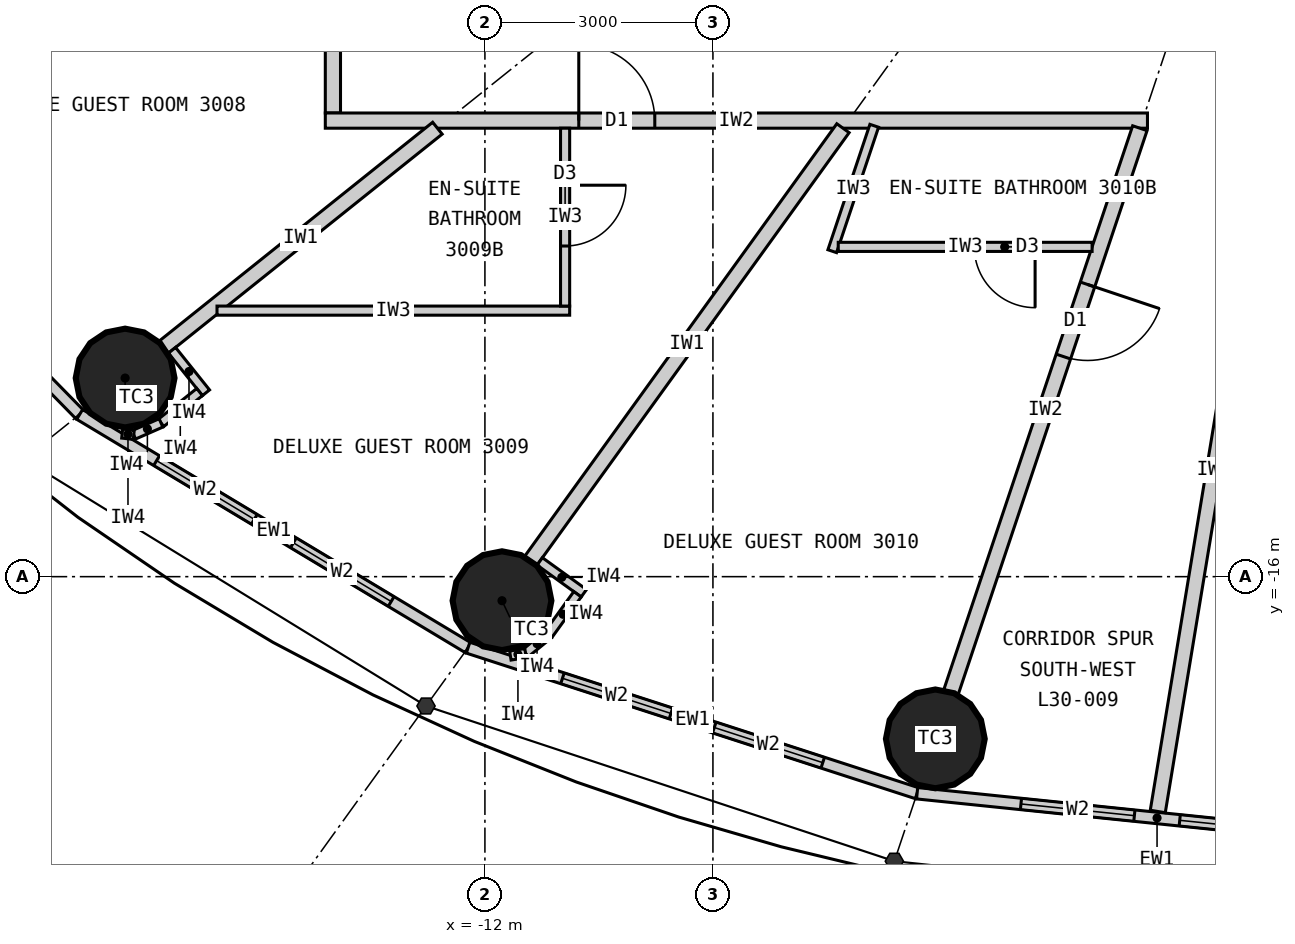
"""IFC4 building model, lengths in metres.
Left out: names, types, materials, properties, quantities, classifications, styles, units other than length and angle.
Written with IfcOpenShell. Run it as: python <this file> out.ifc"""

import sys

from ifc_helpers import new_model, si_unit, direction, frame, frame_2d, origin, origin_2d, place, context, subcontext, project, spatial, rectangle, circle, extrude, element, fill, save


model = new_model("IFC4")
c1 = context("Model", 3, precision=1e-05, world=origin(), true_north=direction((0.0, 1.0)))
c2 = subcontext(c1, "Body", "Model", "MODEL_VIEW")
j1 = project(units=[si_unit("LENGTHUNIT", "METRE"), si_unit("PLANEANGLEUNIT", "RADIAN")], contexts=[c1])
p1 = place(None, origin())
s1 = spatial("IfcSite", under=j1, at=p1, CompositionType="ELEMENT")
p2 = place(p1, origin())
s2 = spatial("IfcBuilding", under=s1, at=p2, CompositionType="ELEMENT")
p3 = place(p2, frame((0.0, 0.0, 118.8)))
s3 = spatial("IfcBuildingStorey", under=s2, at=p3, CompositionType="ELEMENT", Elevation=118.8)
for number, where, z_axis, x_axis in (
    (1, (-16.734, -13.387, 0.0), (0.0, 0.0, 1.0), (1.0, 0.0, 0.0)),
    (2, (-11.775, -16.316, 0.0), (0.0, 0.0, 1.0), (1.0, 0.0, 0.0)),
    (3, (-6.074, -18.135, 0.0), (0.0, 0.0, 1.0), (1.0, 0.0, 0.0)),
):
    element("IfcColumn", number, at=place(p3, frame(where, z_axis=z_axis, x_axis=x_axis)), inside=s3, PredefinedType="COLUMN", context=c2, shape_type="SweptSolid", body=[
        extrude(circle(Radius=0.65, at=origin_2d()), origin(), (0.0, 0.0, 1.0), 3.3),
    ])
p4 = place(p3, frame((-21.287, -9.832, 0.0), z_axis=(0.0, 0.0, 1.0), x_axis=(0.700136650834, -0.714008872605, 0.0)))
e4 = element("IfcWall", 4, at=p4, inside=s3, PredefinedType="ELEMENTEDWALL", context=c2, shape_type="SweptSolid", body=[
    extrude(rectangle(XDim=5.649, YDim=0.15, at=frame_2d((2.825, 0.0))), origin(), (0.0, 0.0, 1.0), 3.12),
])
p5 = place(p4, frame((1.025, 0.0, 0.9)))
e5 = element("IfcOpeningElement", 5, at=p5, cuts=e4, PredefinedType="OPENING", context=c2, shape_type="SweptSolid", body=[
    extrude(rectangle(XDim=1.5, YDim=1.9, at=frame_2d((0.75, 0.95))), frame((0.0, 0.085, 0.0), z_axis=(0.0, -1.0, 0.0), x_axis=(1.0, 0.0, 0.0)), (0.0, 0.0, 1.0), 0.17),
])
p6 = place(p4, frame((3.125, 0.0, 0.9)))
e6 = element("IfcOpeningElement", 6, at=p6, cuts=e4, PredefinedType="OPENING", context=c2, shape_type="SweptSolid", body=[
    extrude(rectangle(XDim=1.5, YDim=1.9, at=frame_2d((0.75, 0.95))), frame((0.0, 0.085, 0.0), z_axis=(0.0, -1.0, 0.0), x_axis=(1.0, 0.0, 0.0)), (0.0, 0.0, 1.0), 0.17),
])
p7 = place(p3, frame((-17.332, -13.866, 0.0), z_axis=(0.0, 0.0, 1.0), x_axis=(0.857308573723, -0.514802884044, 0.0)))
e7 = element("IfcWall", 7, at=p7, inside=s3, PredefinedType="ELEMENTEDWALL", context=c2, shape_type="SweptSolid", body=[
    extrude(rectangle(XDim=5.961, YDim=0.15, at=frame_2d((2.98, 0.0))), origin(), (0.0, 0.0, 1.0), 3.12),
])
p8 = place(p7, frame((1.181, 0.0, 0.9)))
e8 = element("IfcOpeningElement", 8, at=p8, cuts=e7, PredefinedType="OPENING", context=c2, shape_type="SweptSolid", body=[
    extrude(rectangle(XDim=1.5, YDim=1.9, at=frame_2d((0.75, 0.95))), frame((0.0, 0.085, 0.0), z_axis=(0.0, -1.0, 0.0), x_axis=(1.0, 0.0, 0.0)), (0.0, 0.0, 1.0), 0.17),
])
p9 = place(p7, frame((3.281, 0.0, 0.9)))
e9 = element("IfcOpeningElement", 9, at=p9, cuts=e7, PredefinedType="OPENING", context=c2, shape_type="SweptSolid", body=[
    extrude(rectangle(XDim=1.5, YDim=1.9, at=frame_2d((0.75, 0.95))), frame((0.0, 0.085, 0.0), z_axis=(0.0, -1.0, 0.0), x_axis=(1.0, 0.0, 0.0)), (0.0, 0.0, 1.0), 0.17),
])
p10 = place(p3, frame((-12.221, -16.935, 0.0), z_axis=(0.0, 0.0, 1.0), x_axis=(0.951272691506, -0.308350881944, 0.0)))
e10 = element("IfcWall", 10, at=p10, inside=s3, PredefinedType="ELEMENTEDWALL", context=c2, shape_type="SweptSolid", body=[
    extrude(rectangle(XDim=6.211, YDim=0.15, at=frame_2d((3.105, 0.0))), origin(), (0.0, 0.0, 1.0), 3.12),
])
p11 = place(p10, frame((1.305, 0.0, 0.9)))
e11 = element("IfcOpeningElement", 11, at=p11, cuts=e10, PredefinedType="OPENING", context=c2, shape_type="SweptSolid", body=[
    extrude(rectangle(XDim=1.5, YDim=1.9, at=frame_2d((0.75, 0.95))), frame((0.0, 0.085, 0.0), z_axis=(0.0, -1.0, 0.0), x_axis=(1.0, 0.0, 0.0)), (0.0, 0.0, 1.0), 0.17),
])
p12 = place(p10, frame((3.405, 0.0, 0.9)))
e12 = element("IfcOpeningElement", 12, at=p12, cuts=e10, PredefinedType="OPENING", context=c2, shape_type="SweptSolid", body=[
    extrude(rectangle(XDim=1.5, YDim=1.9, at=frame_2d((0.75, 0.95))), frame((0.0, 0.085, 0.0), z_axis=(0.0, -1.0, 0.0), x_axis=(1.0, 0.0, 0.0)), (0.0, 0.0, 1.0), 0.17),
])
p13 = place(p3, frame((-6.313, -18.85, 0.0), z_axis=(0.0, 0.0, 1.0), x_axis=(0.994735690163, -0.102473931887, 0.0)))
e13 = element("IfcWall", 13, at=p13, inside=s3, PredefinedType="ELEMENTEDWALL", context=c2, shape_type="SweptSolid", body=[
    extrude(rectangle(XDim=6.347, YDim=0.15, at=frame_2d((3.173, 0.0))), origin(), (0.0, 0.0, 1.0), 3.12),
])
p14 = place(p13, frame((1.373, 0.0, 0.9)))
e14 = element("IfcOpeningElement", 14, at=p14, cuts=e13, PredefinedType="OPENING", context=c2, shape_type="SweptSolid", body=[
    extrude(rectangle(XDim=1.5, YDim=1.9, at=frame_2d((0.75, 0.95))), frame((0.0, 0.085, 0.0), z_axis=(0.0, -1.0, 0.0), x_axis=(1.0, 0.0, 0.0)), (0.0, 0.0, 1.0), 0.17),
])
p15 = place(p13, frame((3.473, 0.0, 0.9)))
e15 = element("IfcOpeningElement", 15, at=p15, cuts=e13, PredefinedType="OPENING", context=c2, shape_type="SweptSolid", body=[
    extrude(rectangle(XDim=1.5, YDim=1.9, at=frame_2d((0.75, 0.95))), frame((0.0, 0.085, 0.0), z_axis=(0.0, -1.0, 0.0), x_axis=(1.0, 0.0, 0.0)), (0.0, 0.0, 1.0), 0.17),
])
p16 = place(p3, frame((-14.0, 9.9, 0.0), z_axis=(0.0, 0.0, 1.0), x_axis=(0.0, -1.0, 0.0)))
e16 = element("IfcWall", 16, at=p16, inside=s3, PredefinedType="PARTITIONING", context=c2, shape_type="SweptSolid", body=[
    extrude(rectangle(XDim=19.8, YDim=0.2, at=frame_2d((9.9, 0.0))), origin(), (0.0, 0.0, 1.0), 3.12),
])
p17 = place(p16, frame((1.678, 0.0, 0.0)))
e17 = element("IfcOpeningElement", 17, at=p17, cuts=e16, PredefinedType="OPENING", context=c2, shape_type="SweptSolid", body=[
    extrude(rectangle(XDim=1.0, YDim=2.2, at=frame_2d((0.5, 1.1))), frame((0.0, 0.11, 0.0), z_axis=(0.0, -1.0, 0.0), x_axis=(1.0, 0.0, 0.0)), (0.0, 0.0, 1.0), 0.22),
])
p18 = place(p16, frame((7.598, 0.0, 0.0)))
e18 = element("IfcOpeningElement", 18, at=p18, cuts=e16, PredefinedType="OPENING", context=c2, shape_type="SweptSolid", body=[
    extrude(rectangle(XDim=1.0, YDim=2.2, at=frame_2d((0.5, 1.1))), frame((0.0, 0.11, 0.0), z_axis=(0.0, -1.0, 0.0), x_axis=(1.0, 0.0, 0.0)), (0.0, 0.0, 1.0), 0.22),
])
p19 = place(p16, frame((12.26, 0.0, 0.0)))
e19 = element("IfcOpeningElement", 19, at=p19, cuts=e16, PredefinedType="OPENING", context=c2, shape_type="SweptSolid", body=[
    extrude(rectangle(XDim=1.0, YDim=2.2, at=frame_2d((0.5, 1.1))), frame((0.0, 0.11, 0.0), z_axis=(0.0, -1.0, 0.0), x_axis=(1.0, 0.0, 0.0)), (0.0, 0.0, 1.0), 0.22),
])
p20 = place(p16, frame((16.922, 0.0, 0.0)))
e20 = element("IfcOpeningElement", 20, at=p20, cuts=e16, PredefinedType="OPENING", context=c2, shape_type="SweptSolid", body=[
    extrude(rectangle(XDim=1.0, YDim=2.2, at=frame_2d((0.5, 1.1))), frame((0.0, 0.11, 0.0), z_axis=(0.0, -1.0, 0.0), x_axis=(1.0, 0.0, 0.0)), (0.0, 0.0, 1.0), 0.22),
])
p21 = place(p3, frame((-3.283, -10.0, 0.0), z_axis=(0.0, 0.0, 1.0), x_axis=(-1.0, 0.0, 0.0)))
e21 = element("IfcWall", 21, at=p21, inside=s3, PredefinedType="PARTITIONING", context=c2, shape_type="SweptSolid", body=[
    extrude(rectangle(XDim=10.817, YDim=0.2, at=frame_2d((5.409, 0.0))), origin(), (0.0, 0.0, 1.0), 3.12),
])
p22 = place(p21, frame((6.482, 0.0, 0.0)))
e22 = element("IfcOpeningElement", 22, at=p22, cuts=e21, PredefinedType="OPENING", context=c2, shape_type="SweptSolid", body=[
    extrude(rectangle(XDim=1.0, YDim=2.2, at=frame_2d((0.5, 1.1))), frame((0.0, 0.11, 0.0), z_axis=(0.0, -1.0, 0.0), x_axis=(1.0, 0.0, 0.0)), (0.0, 0.0, 1.0), 0.22),
])
p23 = place(p3, frame((-12.625, -10.1, 0.0), z_axis=(0.0, 0.0, 1.0), x_axis=(-0.780863644897, -0.624701503182, 0.0)))
e23 = element("IfcWall", 23, at=p23, inside=s3, PredefinedType="PARTITIONING", context=c2, shape_type="SweptSolid", body=[
    extrude(rectangle(XDim=4.612, YDim=0.2, at=frame_2d((2.306, 0.0))), origin(), (0.0, 0.0, 1.0), 2.37),
])
p24 = place(p3, frame((-7.289, -10.1, 0.0), z_axis=(0.0, 0.0, 1.0), x_axis=(-0.585217367024, -0.81087645997, 0.0)))
e24 = element("IfcWall", 24, at=p24, inside=s3, PredefinedType="PARTITIONING", context=c2, shape_type="SweptSolid", body=[
    extrude(rectangle(XDim=7.016, YDim=0.2, at=frame_2d((3.508, 0.0))), origin(), (0.0, 0.0, 1.0), 2.37),
])
p25 = place(p3, frame((-3.383, -10.1, 0.0), z_axis=(0.0, 0.0, 1.0), x_axis=(-0.317603705574, -0.948223542318, 0.0)))
e25 = element("IfcWall", 25, at=p25, inside=s3, PredefinedType="PARTITIONING", context=c2, shape_type="SweptSolid", body=[
    extrude(rectangle(XDim=7.823, YDim=0.2, at=frame_2d((3.912, 0.0))), origin(), (0.0, 0.0, 1.0), 2.37),
])
p26 = place(p25, frame((2.168, 0.0, 0.0)))
e26 = element("IfcOpeningElement", 26, at=p26, cuts=e25, PredefinedType="OPENING", context=c2, shape_type="SweptSolid", body=[
    extrude(rectangle(XDim=1.0, YDim=2.2, at=frame_2d((0.5, 1.1))), frame((0.0, 0.11, 0.0), z_axis=(0.0, -1.0, 0.0), x_axis=(1.0, 0.0, 0.0)), (0.0, 0.0, 1.0), 0.22),
])
p27 = place(p3, frame((-1.665, -10.1, 0.0), z_axis=(0.0, 0.0, 1.0), x_axis=(-0.162660519103, -0.986682094459, 0.0)))
e27 = element("IfcWall", 27, at=p27, inside=s3, PredefinedType="PARTITIONING", context=c2, shape_type="SweptSolid", body=[
    extrude(rectangle(XDim=9.111, YDim=0.2, at=frame_2d((4.555, 0.0))), origin(), (0.0, 0.0, 1.0), 3.12),
])
p28 = place(p27, frame((1.86, 0.0, 0.0)))
e28 = element("IfcOpeningElement", 28, at=p28, cuts=e27, PredefinedType="OPENING", context=c2, shape_type="SweptSolid", body=[
    extrude(rectangle(XDim=1.0, YDim=2.2, at=frame_2d((0.5, 1.1))), frame((0.0, 0.11, 0.0), z_axis=(0.0, -1.0, 0.0), x_axis=(1.0, 0.0, 0.0)), (0.0, 0.0, 1.0), 0.22),
])
p29 = place(p3, frame((-15.525, -12.5, 0.0), z_axis=(0.0, 0.0, 1.0), x_axis=(1.0, 0.0, 0.0)))
e29 = element("IfcWall", 29, at=p29, inside=s3, PredefinedType="PARTITIONING", context=c2, shape_type="SweptSolid", body=[
    extrude(rectangle(XDim=4.64, YDim=0.12, at=frame_2d((2.32, 0.0))), origin(), (0.0, 0.0, 1.0), 3.12),
])
p30 = place(p3, frame((-10.945, -10.1, 0.0), z_axis=(0.0, 0.0, 1.0), x_axis=(0.0, -1.0, 0.0)))
e30 = element("IfcWall", 30, at=p30, inside=s3, PredefinedType="PARTITIONING", context=c2, shape_type="SweptSolid", body=[
    extrude(rectangle(XDim=2.34, YDim=0.12, at=frame_2d((1.17, 0.0))), origin(), (0.0, 0.0, 1.0), 3.12),
])
p31 = place(p30, frame((0.75, 0.0, 0.0)))
e31 = element("IfcOpeningElement", 31, at=p31, cuts=e30, PredefinedType="OPENING", context=c2, shape_type="SweptSolid", body=[
    extrude(rectangle(XDim=0.8, YDim=2.1, at=frame_2d((0.4, 1.05))), frame((0.0, 0.07, 0.0), z_axis=(0.0, -1.0, 0.0), x_axis=(1.0, 0.0, 0.0)), (0.0, 0.0, 1.0), 0.14),
])
p32 = place(p3, frame((-6.878, -10.068, 0.0), z_axis=(0.0, 0.0, 1.0), x_axis=(-0.317532394508, -0.948247424694, 0.0)))
e32 = element("IfcWall", 32, at=p32, inside=s3, PredefinedType="PARTITIONING", context=c2, shape_type="SweptSolid", body=[
    extrude(rectangle(XDim=1.74, YDim=0.12, at=frame_2d((0.87, 0.0))), origin(), (0.0, 0.0, 1.0), 3.12),
])
p33 = place(p3, frame((-4.011, -11.661, 0.0), z_axis=(0.0, 0.0, 1.0), x_axis=(-1.0, 0.0, 0.0)))
e33 = element("IfcWall", 33, at=p33, inside=s3, PredefinedType="PARTITIONING", context=c2, shape_type="SweptSolid", body=[
    extrude(rectangle(XDim=3.34, YDim=0.12, at=frame_2d((1.67, 0.0))), origin(), (0.0, 0.0, 1.0), 3.12),
])
p34 = place(p33, frame((0.75, 0.0, 0.0)))
e34 = element("IfcOpeningElement", 34, at=p34, cuts=e33, PredefinedType="OPENING", context=c2, shape_type="SweptSolid", body=[
    extrude(rectangle(XDim=0.8, YDim=2.1, at=frame_2d((0.4, 1.05))), frame((0.0, 0.07, 0.0), z_axis=(0.0, -1.0, 0.0), x_axis=(1.0, 0.0, 0.0)), (0.0, 0.0, 1.0), 0.14),
])
p35 = place(p3, frame((-16.117, -13.022, 0.0), z_axis=(0.0, 0.0, 1.0), x_axis=(0.62465344249, -0.780902091677, 0.0)))
e35 = element("IfcWall", 35, at=p35, inside=s3, PredefinedType="PARTITIONING", context=c2, shape_type="SweptSolid", body=[
    extrude(rectangle(XDim=0.716, YDim=0.12, at=frame_2d((0.358, 0.0))), origin(), (0.0, 0.0, 1.0), 3.12),
])
p36 = place(p3, frame((-15.754, -13.571, 0.0), z_axis=(0.0, 0.0, 1.0), x_axis=(-0.780905453553, -0.624649239663, 0.0)))
e36 = element("IfcWall", 36, at=p36, inside=s3, PredefinedType="PARTITIONING", context=c2, shape_type="SweptSolid", body=[
    extrude(rectangle(XDim=0.65, YDim=0.12, at=frame_2d((0.325, 0.0))), origin(), (0.0, 0.0, 1.0), 3.12),
])
p37 = place(p3, frame((-16.262, -13.977, 0.0), z_axis=(0.0, 0.0, 1.0), x_axis=(-0.915985403703, -0.401211590314, 0.0)))
e37 = element("IfcWall", 37, at=p37, inside=s3, PredefinedType="PARTITIONING", context=c2, shape_type="SweptSolid", body=[
    extrude(rectangle(XDim=0.391, YDim=0.12, at=frame_2d((0.196, 0.0))), origin(), (0.0, 0.0, 1.0), 3.12),
])
p38 = place(p3, frame((-16.62, -14.134, 0.0), z_axis=(0.0, 0.0, 1.0), x_axis=(-0.993941871493, 0.109907033867, 0.0)))
e38 = element("IfcWall", 38, at=p38, inside=s3, PredefinedType="PARTITIONING", context=c2, shape_type="SweptSolid", body=[
    extrude(rectangle(XDim=0.153, YDim=0.12, at=frame_2d((0.077, 0.0))), origin(), (0.0, 0.0, 1.0), 3.12),
])
p39 = place(p3, frame((-11.279, -15.799, 0.0), z_axis=(0.0, 0.0, 1.0), x_axis=(0.810912957127, -0.585166793285, 0.0)))
e39 = element("IfcWall", 39, at=p39, inside=s3, PredefinedType="PARTITIONING", context=c2, shape_type="SweptSolid", body=[
    extrude(rectangle(XDim=0.716, YDim=0.12, at=frame_2d((0.358, 0.0))), origin(), (0.0, 0.0, 1.0), 3.12),
])
p40 = place(p3, frame((-10.782, -16.231, 0.0), z_axis=(0.0, 0.0, 1.0), x_axis=(-0.585175102182, -0.810906961239, 0.0)))
e40 = element("IfcWall", 40, at=p40, inside=s3, PredefinedType="PARTITIONING", context=c2, shape_type="SweptSolid", body=[
    extrude(rectangle(XDim=0.65, YDim=0.12, at=frame_2d((0.325, 0.0))), origin(), (0.0, 0.0, 1.0), 3.12),
])
p41 = place(p3, frame((-11.162, -16.759, 0.0), z_axis=(0.0, 0.0, 1.0), x_axis=(-0.775178428527, -0.63174235567, 0.0)))
e41 = element("IfcWall", 41, at=p41, inside=s3, PredefinedType="PARTITIONING", context=c2, shape_type="SweptSolid", body=[
    extrude(rectangle(XDim=0.392, YDim=0.12, at=frame_2d((0.196, 0.0))), origin(), (0.0, 0.0, 1.0), 3.12),
])
p42 = place(p3, frame((-11.466, -17.006, 0.0), z_axis=(0.0, 0.0, 1.0), x_axis=(-0.987228877621, -0.15930832744, 0.0)))
e42 = element("IfcWall", 42, at=p42, inside=s3, PredefinedType="PARTITIONING", context=c2, shape_type="SweptSolid", body=[
    extrude(rectangle(XDim=0.202, YDim=0.12, at=frame_2d((0.101, 0.0))), origin(), (0.0, 0.0, 1.0), 3.12),
])
p43 = place(p8, origin())
e43 = element("IfcWindow", 43, at=p43, inside=s3, PartitioningType="SINGLE_PANEL", PredefinedType="WINDOW", context=c2, shape_type="SweptSolid", body=[
    extrude(rectangle(XDim=1.5, YDim=1.9, at=frame_2d((0.75, 0.95))), frame((0.0, 0.03, 0.0), z_axis=(0.0, -1.0, 0.0), x_axis=(1.0, 0.0, 0.0)), (0.0, 0.0, 1.0), 0.06),
])
fill(e8, e43)
p44 = place(p9, origin())
e44 = element("IfcWindow", 44, at=p44, inside=s3, PartitioningType="SINGLE_PANEL", PredefinedType="WINDOW", context=c2, shape_type="SweptSolid", body=[
    extrude(rectangle(XDim=1.5, YDim=1.9, at=frame_2d((0.75, 0.95))), frame((0.0, 0.03, 0.0), z_axis=(0.0, -1.0, 0.0), x_axis=(1.0, 0.0, 0.0)), (0.0, 0.0, 1.0), 0.06),
])
fill(e9, e44)
p45 = place(p11, origin())
e45 = element("IfcWindow", 45, at=p45, inside=s3, PartitioningType="SINGLE_PANEL", PredefinedType="WINDOW", context=c2, shape_type="SweptSolid", body=[
    extrude(rectangle(XDim=1.5, YDim=1.9, at=frame_2d((0.75, 0.95))), frame((0.0, 0.03, 0.0), z_axis=(0.0, -1.0, 0.0), x_axis=(1.0, 0.0, 0.0)), (0.0, 0.0, 1.0), 0.06),
])
fill(e11, e45)
p46 = place(p12, origin())
e46 = element("IfcWindow", 46, at=p46, inside=s3, PartitioningType="SINGLE_PANEL", PredefinedType="WINDOW", context=c2, shape_type="SweptSolid", body=[
    extrude(rectangle(XDim=1.5, YDim=1.9, at=frame_2d((0.75, 0.95))), frame((0.0, 0.03, 0.0), z_axis=(0.0, -1.0, 0.0), x_axis=(1.0, 0.0, 0.0)), (0.0, 0.0, 1.0), 0.06),
])
fill(e12, e46)
p47 = place(p14, origin())
e47 = element("IfcWindow", 47, at=p47, inside=s3, PartitioningType="SINGLE_PANEL", PredefinedType="WINDOW", context=c2, shape_type="SweptSolid", body=[
    extrude(rectangle(XDim=1.5, YDim=1.9, at=frame_2d((0.75, 0.95))), frame((0.0, 0.03, 0.0), z_axis=(0.0, -1.0, 0.0), x_axis=(1.0, 0.0, 0.0)), (0.0, 0.0, 1.0), 0.06),
])
fill(e14, e47)
p48 = place(p15, origin())
e48 = element("IfcWindow", 48, at=p48, inside=s3, PartitioningType="SINGLE_PANEL", PredefinedType="WINDOW", context=c2, shape_type="SweptSolid", body=[
    extrude(rectangle(XDim=1.5, YDim=1.9, at=frame_2d((0.75, 0.95))), frame((0.0, 0.03, 0.0), z_axis=(0.0, -1.0, 0.0), x_axis=(1.0, 0.0, 0.0)), (0.0, 0.0, 1.0), 0.06),
])
fill(e15, e48)
p49 = place(p31, origin())
e49 = element("IfcDoor", 49, at=p49, inside=s3, OperationType="SINGLE_SWING_LEFT", PredefinedType="DOOR", context=c2, shape_type="SweptSolid", body=[
    extrude(rectangle(XDim=0.8, YDim=2.1, at=frame_2d((0.4, 1.05))), frame((0.0, 0.025, 0.0), z_axis=(0.0, -1.0, 0.0), x_axis=(1.0, 0.0, 0.0)), (0.0, 0.0, 1.0), 0.05),
])
fill(e31, e49)
p50 = place(p22, origin())
e50 = element("IfcDoor", 50, at=p50, inside=s3, OperationType="SINGLE_SWING_RIGHT", PredefinedType="DOOR", context=c2, shape_type="SweptSolid", body=[
    extrude(rectangle(XDim=1.0, YDim=2.2, at=frame_2d((0.5, 1.1))), frame((0.0, 0.025, 0.0), z_axis=(0.0, -1.0, 0.0), x_axis=(1.0, 0.0, 0.0)), (0.0, 0.0, 1.0), 0.05),
])
fill(e22, e50)
p51 = place(p34, origin())
e51 = element("IfcDoor", 51, at=p51, inside=s3, OperationType="SINGLE_SWING_LEFT", PredefinedType="DOOR", context=c2, shape_type="SweptSolid", body=[
    extrude(rectangle(XDim=0.8, YDim=2.1, at=frame_2d((0.4, 1.05))), frame((0.0, 0.025, 0.0), z_axis=(0.0, -1.0, 0.0), x_axis=(1.0, 0.0, 0.0)), (0.0, 0.0, 1.0), 0.05),
])
fill(e34, e51)
p52 = place(p26, origin())
e52 = element("IfcDoor", 52, at=p52, inside=s3, OperationType="SINGLE_SWING_LEFT", PredefinedType="DOOR", context=c2, shape_type="SweptSolid", body=[
    extrude(rectangle(XDim=1.0, YDim=2.2, at=frame_2d((0.5, 1.1))), frame((0.0, 0.025, 0.0), z_axis=(0.0, -1.0, 0.0), x_axis=(1.0, 0.0, 0.0)), (0.0, 0.0, 1.0), 0.05),
])
fill(e26, e52)
save(model, sys.argv[1])
